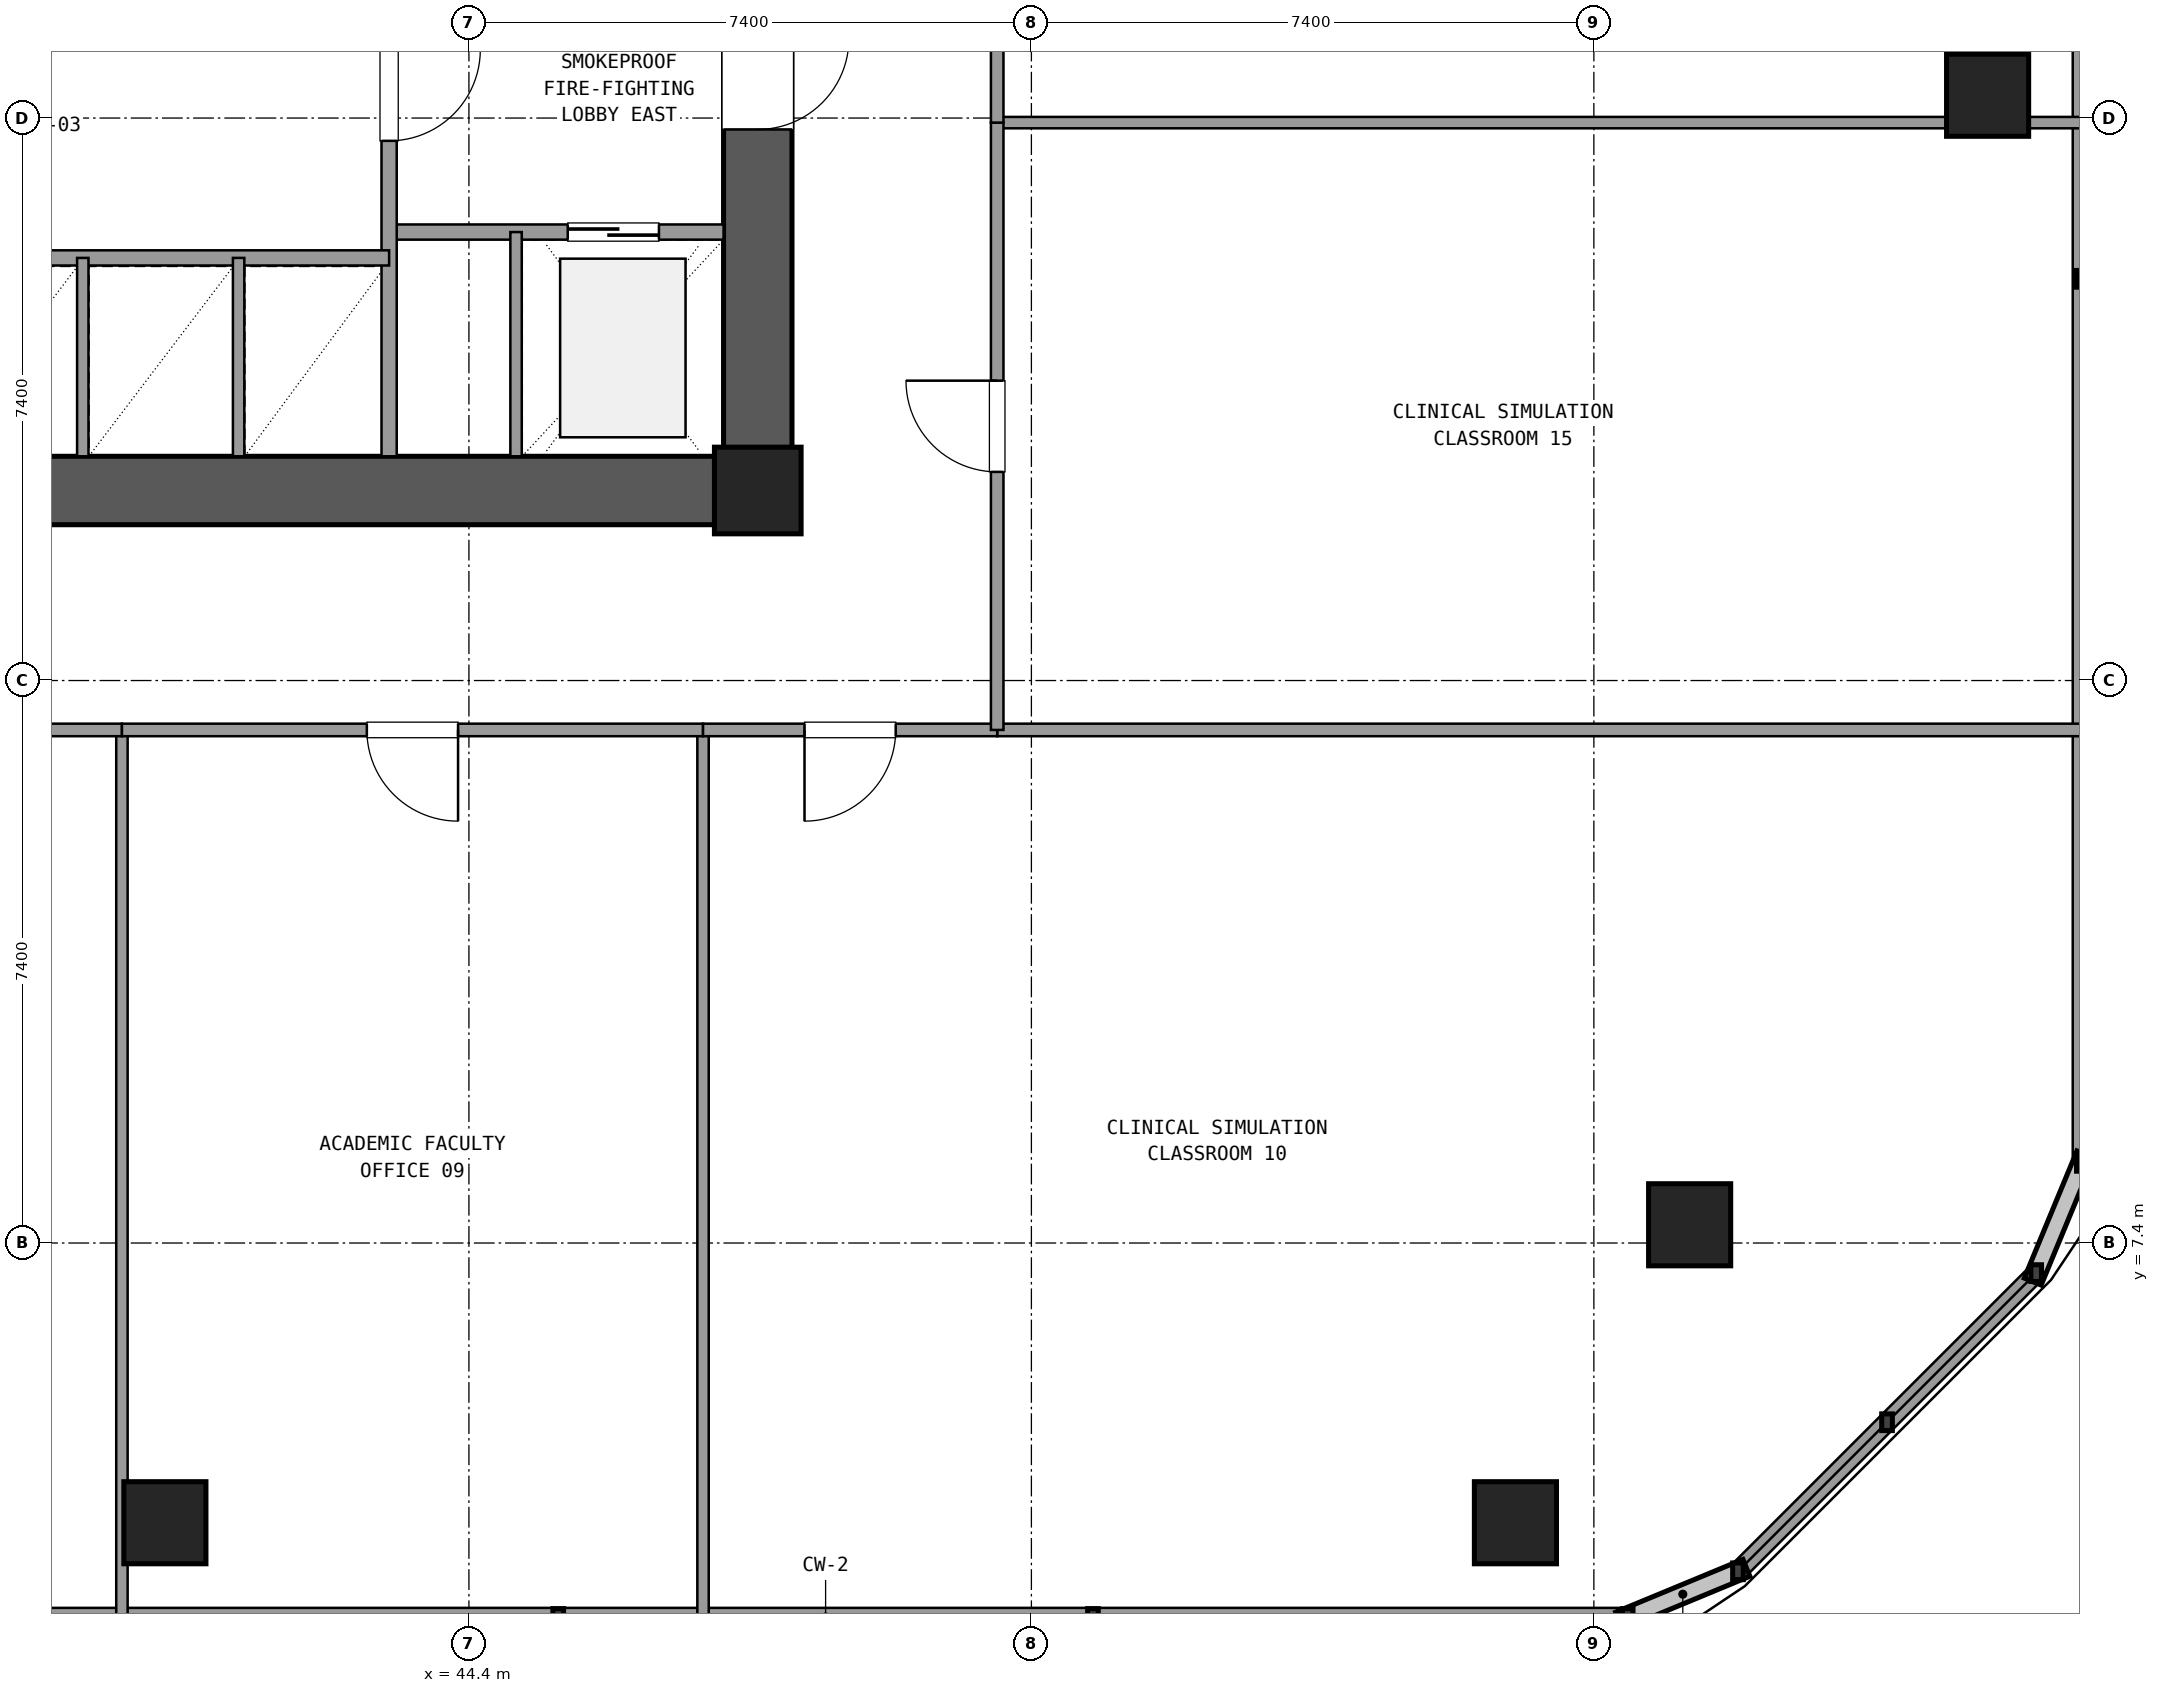
"""IFC4 building model, lengths in metres.
Left out: names, types, materials, properties, quantities, classifications, styles, units other than length and angle.
Written with IfcOpenShell. Run it as: python <this file> out.ifc"""

import sys

from ifc_helpers import new_model, si_unit, direction, frame, frame_2d, origin, origin_2d, place, context, subcontext, project, spatial, rectangle, extrude, element, fill, save


model = new_model("IFC4")
c1 = context("Model", 3, precision=1e-05, world=origin(), true_north=direction((0.0, 1.0)))
c2 = subcontext(c1, "Body", "Model", "MODEL_VIEW")
j1 = project(units=[si_unit("LENGTHUNIT", "METRE"), si_unit("PLANEANGLEUNIT", "RADIAN")], contexts=[c1])
p1 = place(None, origin())
s1 = spatial("IfcSite", under=j1, at=p1, CompositionType="ELEMENT")
p2 = place(p1, origin())
s2 = spatial("IfcBuilding", under=s1, at=p2, CompositionType="ELEMENT")
p3 = place(p2, frame((0.0, 0.0, 49.14)))
s3 = spatial("IfcBuildingStorey", under=s2, at=p3, CompositionType="ELEMENT", Elevation=49.14)
p4 = place(p3, frame((48.2, 17.3, 0.0), z_axis=(0.0, 0.0, 1.0), x_axis=(1.0, 0.0, 0.0)))
e1 = element("IfcColumn", 1, at=p4, inside=s3, PredefinedType="COLUMN", context=c2, shape_type="SweptSolid", body=[
    extrude(rectangle(XDim=1.14, YDim=1.14, at=origin_2d()), origin(), (0.0, 0.0, 1.0), 3.6),
])
p5 = place(p3, frame((37.565, 17.3, 0.0), z_axis=(0.0, 0.0, 1.0), x_axis=(1.0, 0.0, 0.0)))
e2 = element("IfcWall", 2, at=p5, inside=s3, PredefinedType="SHEAR", context=c2, shape_type="SweptSolid", body=[
    extrude(rectangle(XDim=10.07, YDim=0.9, at=frame_2d((5.035, 0.0))), origin(), (0.0, 0.0, 1.0), 3.32),
])
p6 = place(p3, frame((48.2, 17.865, 0.0), z_axis=(0.0, 0.0, 1.0), x_axis=(0.0, 1.0, 0.0)))
e3 = element("IfcWall", 3, at=p6, inside=s3, PredefinedType="SHEAR", context=c2, shape_type="SweptSolid", body=[
    extrude(rectangle(XDim=7.47, YDim=0.9, at=frame_2d((3.735, 0.0))), origin(), (0.0, 0.0, 1.0), 3.32),
])
p7 = place(p6, frame((4.185, 0.0, 0.0)))
e4 = element("IfcOpeningElement", 4, at=p7, cuts=e3, PredefinedType="OPENING", context=c2, shape_type="SweptSolid", body=[
    extrude(rectangle(XDim=1.2, YDim=2.15, at=frame_2d((0.6, 1.075))), frame((0.0, 0.46, 0.0), z_axis=(0.0, -1.0, 0.0), x_axis=(1.0, 0.0, 0.0)), (0.0, 0.0, 1.0), 0.92),
])
for number, where, z_axis, x_axis in (
    (5, (40.4, 3.72, 0.0), (0.0, 0.0, 1.0), (1.0, 0.0, 0.0)),
    (6, (58.168, 3.72, 0.0), (0.0, 0.0, 1.0), (1.0, 0.0, 0.0)),
    (7, (60.46, 7.64, 0.0), (0.0, 0.0, 1.0), (1.0, 0.0, 0.0)),
    (8, (64.38, 22.5, 0.0), (0.0, 0.0, 1.0), (1.0, 0.0, 0.0)),
):
    element("IfcColumn", number, at=place(p3, frame(where, z_axis=z_axis, x_axis=x_axis)), inside=s3, PredefinedType="COLUMN", context=c2, shape_type="SweptSolid", body=[
        extrude(rectangle(XDim=1.08, YDim=1.08, at=origin_2d()), origin(), (0.0, 0.0, 1.0), 3.6),
    ])
p8 = place(p3, frame((38.54, 2.48, 0.0), z_axis=(0.0, 0.0, 1.0), x_axis=(1.0, 0.0, 0.0)))
e9 = element("IfcWall", 9, at=p8, inside=s3, PredefinedType="SOLIDWALL", context=c2, shape_type="SweptSolid", body=[
    extrude(rectangle(XDim=21.105, YDim=0.24, at=frame_2d((10.552, 0.0))), origin(), (0.0, 0.0, 1.0), 0.85),
])
p9 = place(p3, frame((61.096, 3.081, 0.0), z_axis=(0.0, 0.0, 1.0), x_axis=(0.707128783731, 0.707084777957, 0.0)))
e10 = element("IfcWall", 10, at=p9, inside=s3, PredefinedType="SOLIDWALL", context=c2, shape_type="SweptSolid", body=[
    extrude(rectangle(XDim=5.548, YDim=0.24, at=frame_2d((2.774, 0.0))), origin(), (0.0, 0.0, 1.0), 0.85),
])
p10 = place(p3, frame((65.62, 8.455, 0.0), z_axis=(0.0, 0.0, 1.0), x_axis=(0.0, 1.0, 0.0)))
e11 = element("IfcWall", 11, at=p10, inside=s3, PredefinedType="SOLIDWALL", context=c2, shape_type="SweptSolid", body=[
    extrude(rectangle(XDim=34.89, YDim=0.24, at=frame_2d((17.445, 0.0))), origin(), (0.0, 0.0, 1.0), 0.85),
])
p11 = place(p3, frame((43.35, 20.7, 0.0), z_axis=(0.0, 0.0, 1.0), x_axis=(1.0, 0.0, 0.0)))
e12 = element("IfcWall", 12, at=p11, inside=s3, PredefinedType="SOLIDWALL", context=c2, shape_type="SweptSolid", body=[
    extrude(rectangle(XDim=4.4, YDim=0.2, at=frame_2d((2.2, 0.0))), origin(), (0.0, 0.0, 1.0), 2.61),
])
p12 = place(p11, frame((2.35, 0.0, 0.0)))
e13 = element("IfcOpeningElement", 13, at=p12, cuts=e12, PredefinedType="OPENING", context=c2, shape_type="SweptSolid", body=[
    extrude(rectangle(XDim=1.2, YDim=2.15, at=frame_2d((0.6, 1.075))), frame((0.0, 0.11, 0.0), z_axis=(0.0, -1.0, 0.0), x_axis=(1.0, 0.0, 0.0)), (0.0, 0.0, 1.0), 0.22),
])
p13 = place(p3, frame((43.35, 17.75, 0.0), z_axis=(0.0, 0.0, 1.0), x_axis=(0.0, 1.0, 0.0)))
e14 = element("IfcWall", 14, at=p13, inside=s3, PredefinedType="SOLIDWALL", context=c2, shape_type="SweptSolid", body=[
    extrude(rectangle(XDim=6.9, YDim=0.2, at=frame_2d((3.45, 0.0))), origin(), (0.0, 0.0, 1.0), 2.61),
])
p14 = place(p13, frame((4.15, 0.0, 0.0)))
e15 = element("IfcOpeningElement", 15, at=p14, cuts=e14, PredefinedType="OPENING", context=c2, shape_type="SweptSolid", body=[
    extrude(rectangle(XDim=1.2, YDim=2.15, at=frame_2d((0.6, 1.075))), frame((0.0, 0.11, 0.0), z_axis=(0.0, -1.0, 0.0), x_axis=(1.0, 0.0, 0.0)), (0.0, 0.0, 1.0), 0.22),
])
p15 = place(p3, frame((45.02, 17.75, 0.0), z_axis=(0.0, 0.0, 1.0), x_axis=(0.0, 1.0, 0.0)))
e16 = element("IfcWall", 16, at=p15, inside=s3, PredefinedType="PARTITIONING", context=c2, shape_type="SweptSolid", body=[
    extrude(rectangle(XDim=2.95, YDim=0.15, at=frame_2d((1.475, 0.0))), origin(), (0.0, 0.0, 1.0), 2.61),
])
p16 = place(p3, frame((37.25, 20.36, 0.0), z_axis=(0.0, 0.0, 1.0), x_axis=(1.0, 0.0, 0.0)))
e17 = element("IfcWall", 17, at=p16, inside=s3, PredefinedType="SOLIDWALL", context=c2, shape_type="SweptSolid", body=[
    extrude(rectangle(XDim=6.1, YDim=0.2, at=frame_2d((3.05, 0.0))), origin(), (0.0, 0.0, 1.0), 2.61),
])
for number, where, z_axis, x_axis in (
    (18, (39.32, 17.75, 0.0), (0.0, 0.0, 1.0), (0.0, 1.0, 0.0)),
    (19, (41.37, 17.75, 0.0), (0.0, 0.0, 1.0), (0.0, 1.0, 0.0)),
):
    element("IfcWall", number, at=place(p3, frame(where, z_axis=z_axis, x_axis=x_axis)), inside=s3, PredefinedType="PARTITIONING", context=c2, shape_type="SweptSolid", body=[
        extrude(rectangle(XDim=2.61, YDim=0.15, at=frame_2d((1.305, 0.0))), origin(), (0.0, 0.0, 1.0), 2.61),
    ])
p17 = place(p3, frame((51.35, 14.15, 0.0), z_axis=(0.0, 0.0, 1.0), x_axis=(1.0, 0.0, 0.0)))
e20 = element("IfcWall", 20, at=p17, inside=s3, PredefinedType="PARTITIONING", context=c2, shape_type="SweptSolid", body=[
    extrude(rectangle(XDim=14.25, YDim=0.165, at=frame_2d((7.125, 0.0))), origin(), (0.0, 0.0, 1.0), 2.61),
])
p18 = place(p3, frame((39.835, 14.15, 0.0), z_axis=(0.0, 0.0, 1.0), x_axis=(0.0, -1.0, 0.0)))
e21 = element("IfcWall", 21, at=p18, inside=s3, PredefinedType="PARTITIONING", context=c2, shape_type="SweptSolid", body=[
    extrude(rectangle(XDim=11.65, YDim=0.15, at=frame_2d((5.825, 0.0))), origin(), (0.0, 0.0, 1.0), 2.61),
])
p19 = place(p3, frame((29.278, 14.15, 0.0), z_axis=(0.0, 0.0, 1.0), x_axis=(1.0, 0.0, 0.0)))
e22 = element("IfcWall", 22, at=p19, inside=s3, PredefinedType="PARTITIONING", context=c2, shape_type="SweptSolid", body=[
    extrude(rectangle(XDim=10.557, YDim=0.165, at=frame_2d((5.278, 0.0))), origin(), (0.0, 0.0, 1.0), 2.61),
])
p20 = place(p19, frame((4.679, 0.0, 0.0)))
e23 = element("IfcOpeningElement", 23, at=p20, cuts=e22, PredefinedType="OPENING", context=c2, shape_type="SweptSolid", body=[
    extrude(rectangle(XDim=1.2, YDim=2.15, at=frame_2d((0.6, 1.075))), frame((0.0, 0.093, 0.0), z_axis=(0.0, -1.0, 0.0), x_axis=(1.0, 0.0, 0.0)), (0.0, 0.0, 1.0), 0.185),
])
p21 = place(p3, frame((47.48, 14.15, 0.0), z_axis=(0.0, 0.0, 1.0), x_axis=(0.0, -1.0, 0.0)))
e24 = element("IfcWall", 24, at=p21, inside=s3, PredefinedType="PARTITIONING", context=c2, shape_type="SweptSolid", body=[
    extrude(rectangle(XDim=11.65, YDim=0.15, at=frame_2d((5.825, 0.0))), origin(), (0.0, 0.0, 1.0), 2.61),
])
p22 = place(p3, frame((39.835, 14.15, 0.0), z_axis=(0.0, 0.0, 1.0), x_axis=(1.0, 0.0, 0.0)))
e25 = element("IfcWall", 25, at=p22, inside=s3, PredefinedType="PARTITIONING", context=c2, shape_type="SweptSolid", body=[
    extrude(rectangle(XDim=7.645, YDim=0.165, at=frame_2d((3.823, 0.0))), origin(), (0.0, 0.0, 1.0), 2.61),
])
p23 = place(p22, frame((3.222, 0.0, 0.0)))
e26 = element("IfcOpeningElement", 26, at=p23, cuts=e25, PredefinedType="OPENING", context=c2, shape_type="SweptSolid", body=[
    extrude(rectangle(XDim=1.2, YDim=2.15, at=frame_2d((0.6, 1.075))), frame((0.0, 0.093, 0.0), z_axis=(0.0, -1.0, 0.0), x_axis=(1.0, 0.0, 0.0)), (0.0, 0.0, 1.0), 0.185),
])
p24 = place(p3, frame((47.48, 14.15, 0.0), z_axis=(0.0, 0.0, 1.0), x_axis=(1.0, 0.0, 0.0)))
e27 = element("IfcWall", 27, at=p24, inside=s3, PredefinedType="PARTITIONING", context=c2, shape_type="SweptSolid", body=[
    extrude(rectangle(XDim=3.87, YDim=0.165, at=frame_2d((1.935, 0.0))), origin(), (0.0, 0.0, 1.0), 2.61),
])
p25 = place(p24, frame((1.335, 0.0, 0.0)))
e28 = element("IfcOpeningElement", 28, at=p25, cuts=e27, PredefinedType="OPENING", context=c2, shape_type="SweptSolid", body=[
    extrude(rectangle(XDim=1.2, YDim=2.15, at=frame_2d((0.6, 1.075))), frame((0.0, 0.093, 0.0), z_axis=(0.0, -1.0, 0.0), x_axis=(1.0, 0.0, 0.0)), (0.0, 0.0, 1.0), 0.185),
])
p26 = place(p3, frame((51.35, 22.14, 0.0), z_axis=(0.0, 0.0, 1.0), x_axis=(1.0, 0.0, 0.0)))
e29 = element("IfcWall", 29, at=p26, inside=s3, PredefinedType="PARTITIONING", context=c2, shape_type="SweptSolid", body=[
    extrude(rectangle(XDim=14.25, YDim=0.15, at=frame_2d((7.125, 0.0))), origin(), (0.0, 0.0, 1.0), 2.61),
])
p27 = place(p3, frame((51.35, 14.15, 0.0), z_axis=(0.0, 0.0, 1.0), x_axis=(0.0, 1.0, 0.0)))
e30 = element("IfcWall", 30, at=p27, inside=s3, PredefinedType="PARTITIONING", context=c2, shape_type="SweptSolid", body=[
    extrude(rectangle(XDim=7.99, YDim=0.165, at=frame_2d((3.995, 0.0))), origin(), (0.0, 0.0, 1.0), 2.61),
])
p28 = place(p27, frame((3.395, 0.0, 0.0)))
e31 = element("IfcOpeningElement", 31, at=p28, cuts=e30, PredefinedType="OPENING", context=c2, shape_type="SweptSolid", body=[
    extrude(rectangle(XDim=1.2, YDim=2.15, at=frame_2d((0.6, 1.075))), frame((0.0, 0.093, 0.0), z_axis=(0.0, -1.0, 0.0), x_axis=(1.0, 0.0, 0.0)), (0.0, 0.0, 1.0), 0.185),
])
p29 = place(p3, frame((51.35, 22.14, 0.0), z_axis=(0.0, 0.0, 1.0), x_axis=(0.0, 1.0, 0.0)))
e32 = element("IfcWall", 32, at=p29, inside=s3, PredefinedType="PARTITIONING", context=c2, shape_type="SweptSolid", body=[
    extrude(rectangle(XDim=7.755, YDim=0.165, at=frame_2d((3.877, 0.0))), origin(), (0.0, 0.0, 1.0), 2.61),
])
p30 = place(p29, frame((3.277, 0.0, 0.0)))
e33 = element("IfcOpeningElement", 33, at=p30, cuts=e32, PredefinedType="OPENING", context=c2, shape_type="SweptSolid", body=[
    extrude(rectangle(XDim=1.2, YDim=2.15, at=frame_2d((0.6, 1.075))), frame((0.0, 0.093, 0.0), z_axis=(0.0, -1.0, 0.0), x_axis=(1.0, 0.0, 0.0)), (0.0, 0.0, 1.0), 0.185),
])
p31 = place(p12, origin())
e34 = element("IfcDoor", 34, at=p31, inside=s3, OperationType="SLIDING_TO_RIGHT", PredefinedType="DOOR", context=c2, shape_type="SweptSolid", body=[
    extrude(rectangle(XDim=1.2, YDim=2.15, at=frame_2d((0.6, 1.075))), frame((0.0, 0.025, 0.0), z_axis=(0.0, -1.0, 0.0), x_axis=(1.0, 0.0, 0.0)), (0.0, 0.0, 1.0), 0.05),
])
fill(e13, e34)
p32 = place(p14, frame((1.2, 0.0, 0.0), z_axis=(0.0, 0.0, 1.0), x_axis=(-1.0, 0.0, 0.0)))
e35 = element("IfcDoor", 35, at=p32, inside=s3, OperationType="SINGLE_SWING_RIGHT", PredefinedType="DOOR", context=c2, shape_type="SweptSolid", body=[
    extrude(rectangle(XDim=1.2, YDim=2.15, at=frame_2d((0.6, 1.075))), frame((0.0, 0.025, 0.0), z_axis=(0.0, -1.0, 0.0), x_axis=(1.0, 0.0, 0.0)), (0.0, 0.0, 1.0), 0.05),
])
fill(e15, e35)
p33 = place(p7, frame((1.2, 0.0, 0.0), z_axis=(0.0, 0.0, 1.0), x_axis=(-1.0, 0.0, 0.0)))
e36 = element("IfcDoor", 36, at=p33, inside=s3, OperationType="SINGLE_SWING_RIGHT", PredefinedType="DOOR", context=c2, shape_type="SweptSolid", body=[
    extrude(rectangle(XDim=1.2, YDim=2.15, at=frame_2d((0.6, 1.075))), frame((0.0, 0.025, 0.0), z_axis=(0.0, -1.0, 0.0), x_axis=(1.0, 0.0, 0.0)), (0.0, 0.0, 1.0), 0.05),
])
fill(e4, e36)
p34 = place(p23, frame((1.2, 0.0, 0.0), z_axis=(0.0, 0.0, 1.0), x_axis=(-1.0, 0.0, 0.0)))
e37 = element("IfcDoor", 37, at=p34, inside=s3, OperationType="SINGLE_SWING_RIGHT", PredefinedType="DOOR", context=c2, shape_type="SweptSolid", body=[
    extrude(rectangle(XDim=1.2, YDim=2.15, at=frame_2d((0.6, 1.075))), frame((0.0, 0.025, 0.0), z_axis=(0.0, -1.0, 0.0), x_axis=(1.0, 0.0, 0.0)), (0.0, 0.0, 1.0), 0.05),
])
fill(e26, e37)
p35 = place(p25, frame((1.2, 0.0, 0.0), z_axis=(0.0, 0.0, 1.0), x_axis=(-1.0, 0.0, 0.0)))
e38 = element("IfcDoor", 38, at=p35, inside=s3, OperationType="SINGLE_SWING_LEFT", PredefinedType="DOOR", context=c2, shape_type="SweptSolid", body=[
    extrude(rectangle(XDim=1.2, YDim=2.15, at=frame_2d((0.6, 1.075))), frame((0.0, 0.025, 0.0), z_axis=(0.0, -1.0, 0.0), x_axis=(1.0, 0.0, 0.0)), (0.0, 0.0, 1.0), 0.05),
])
fill(e28, e38)
p36 = place(p28, origin())
e39 = element("IfcDoor", 39, at=p36, inside=s3, OperationType="SINGLE_SWING_RIGHT", PredefinedType="DOOR", context=c2, shape_type="SweptSolid", body=[
    extrude(rectangle(XDim=1.2, YDim=2.15, at=frame_2d((0.6, 1.075))), frame((0.0, 0.025, 0.0), z_axis=(0.0, -1.0, 0.0), x_axis=(1.0, 0.0, 0.0)), (0.0, 0.0, 1.0), 0.05),
])
fill(e31, e39)
save(model, sys.argv[1])
